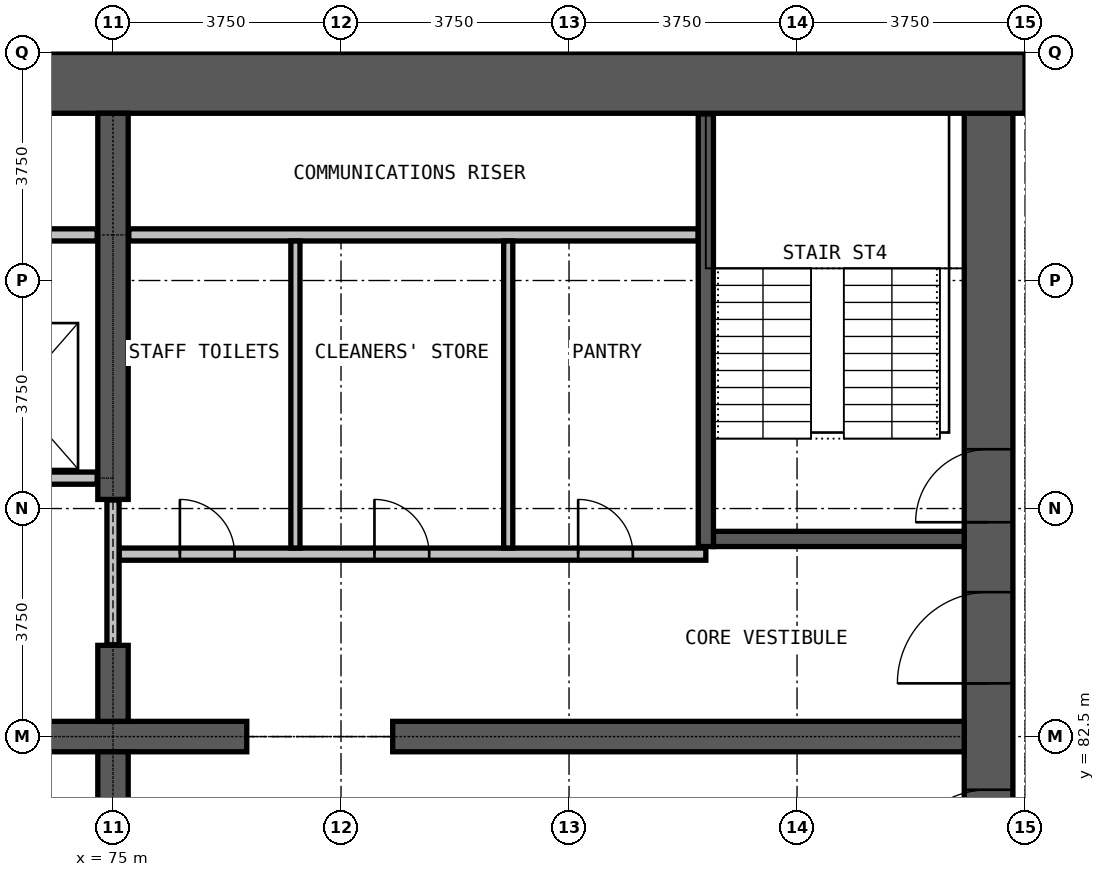
"""IFC4 building model, lengths in metres.
Left out: names, types, materials, properties, quantities, classifications, styles, units other than length and angle.
Written with IfcOpenShell. Run it as: python <this file> out.ifc"""

import sys

from ifc_helpers import new_model, si_unit, direction, frame, frame_2d, origin, place, context, subcontext, project, spatial, rectangle, extrude, element, fill, save


model = new_model("IFC4")
c1 = context("Model", 3, precision=1e-05, world=origin(), true_north=direction((0.0, 1.0)))
c2 = subcontext(c1, "Body", "Model", "MODEL_VIEW")
j1 = project(units=[si_unit("LENGTHUNIT", "METRE"), si_unit("PLANEANGLEUNIT", "RADIAN")], contexts=[c1])
p1 = place(None, origin())
s1 = spatial("IfcSite", under=j1, at=p1, CompositionType="ELEMENT")
p2 = place(p1, origin())
s2 = spatial("IfcBuilding", under=s1, at=p2, CompositionType="ELEMENT")
p3 = place(p2, frame((0.0, 0.0, 118.0)))
s3 = spatial("IfcBuildingStorey", under=s2, at=p3, CompositionType="ELEMENT", Elevation=118.0)
p4 = place(p3, frame((89.4, 72.25, 0.0), z_axis=(0.0, 0.0, 1.0), x_axis=(0.0, 1.0, 0.0)))
e1 = element("IfcWall", 1, at=p4, inside=s3, PredefinedType="SHEAR", context=c2, shape_type="SweptSolid", body=[
    extrude(rectangle(XDim=20.5, YDim=0.8, at=frame_2d((10.25, 0.0))), origin(), (0.0, 0.0, 1.0), 3.6),
])
p5 = place(p4, frame((0.275, 0.0, 0.0)))
e2 = element("IfcOpeningElement", 2, at=p5, cuts=e1, PredefinedType="OPENING", context=c2, shape_type="SweptSolid", body=[
    extrude(rectangle(XDim=1.2, YDim=2.2, at=frame_2d((0.6, 1.1))), frame((0.0, 0.41, 0.0), z_axis=(0.0, -1.0, 0.0), x_axis=(1.0, 0.0, 0.0)), (0.0, 0.0, 1.0), 0.82),
])
p6 = place(p4, frame((13.775, 0.0, 0.0)))
e3 = element("IfcOpeningElement", 3, at=p6, cuts=e1, PredefinedType="OPENING", context=c2, shape_type="SweptSolid", body=[
    extrude(rectangle(XDim=1.2, YDim=2.2, at=frame_2d((0.6, 1.1))), frame((0.0, 0.41, 0.0), z_axis=(0.0, -1.0, 0.0), x_axis=(1.0, 0.0, 0.0)), (0.0, 0.0, 1.0), 0.82),
])
p7 = place(p4, frame((7.875, 0.0, 0.0)))
e4 = element("IfcOpeningElement", 4, at=p7, cuts=e1, PredefinedType="OPENING", context=c2, shape_type="SweptSolid", body=[
    extrude(rectangle(XDim=1.5, YDim=2.2, at=frame_2d((0.75, 1.1))), frame((0.0, 0.41, 0.0), z_axis=(0.0, -1.0, 0.0), x_axis=(1.0, 0.0, 0.0)), (0.0, 0.0, 1.0), 0.82),
])
p8 = place(p4, frame((11.125, 0.0, 0.0)))
e5 = element("IfcOpeningElement", 5, at=p8, cuts=e1, PredefinedType="OPENING", context=c2, shape_type="SweptSolid", body=[
    extrude(rectangle(XDim=1.5, YDim=2.2, at=frame_2d((0.75, 1.1))), frame((0.0, 0.41, 0.0), z_axis=(0.0, -1.0, 0.0), x_axis=(1.0, 0.0, 0.0)), (0.0, 0.0, 1.0), 0.82),
])
p9 = place(p3, frame((90.0, 93.25, 0.0), z_axis=(0.0, 0.0, 1.0), x_axis=(-1.0, 0.0, 0.0)))
e6 = element("IfcWall", 6, at=p9, inside=s3, PredefinedType="SHEAR", context=c2, shape_type="SweptSolid", body=[
    extrude(rectangle(XDim=30.0, YDim=1.0, at=frame_2d((15.0, 0.0))), origin(), (0.0, 0.0, 1.0), 3.6),
])
p10 = place(p3, frame((72.8, 82.5, 0.0), z_axis=(0.0, 0.0, 1.0), x_axis=(1.0, 0.0, 0.0)))
e7 = element("IfcWall", 7, at=p10, inside=s3, PredefinedType="SHEAR", context=c2, shape_type="SweptSolid", body=[
    extrude(rectangle(XDim=4.4, YDim=0.5, at=frame_2d((2.2, 0.0))), origin(), (0.0, 0.0, 1.0), 3.6),
])
p11 = place(p3, frame((79.6, 82.5, 0.0), z_axis=(0.0, 0.0, 1.0), x_axis=(1.0, 0.0, 0.0)))
e8 = element("IfcWall", 8, at=p11, inside=s3, PredefinedType="SHEAR", context=c2, shape_type="SweptSolid", body=[
    extrude(rectangle(XDim=9.4, YDim=0.5, at=frame_2d((4.7, 0.0))), origin(), (0.0, 0.0, 1.0), 3.6),
])
for number, where, z_axis, x_axis in (
    (9, (75.0, 81.0, 0.0), (0.0, 0.0, 1.0), (0.0, 1.0, 0.0)),
    (10, (75.0, 82.75, 0.0), (0.0, 0.0, 1.0), (0.0, 1.0, 0.0)),
):
    element("IfcWall", number, at=place(p3, frame(where, z_axis=z_axis, x_axis=x_axis)), inside=s3, PredefinedType="SHEAR", context=c2, shape_type="SweptSolid", body=[
        extrude(rectangle(XDim=1.25, YDim=0.5, at=frame_2d((0.625, 0.0))), origin(), (0.0, 0.0, 1.0), 3.6),
    ])
p12 = place(p3, frame((75.0, 86.4, 0.0), z_axis=(0.0, 0.0, 1.0), x_axis=(0.0, 1.0, 0.0)))
e11 = element("IfcWall", 11, at=p12, inside=s3, PredefinedType="SHEAR", context=c2, shape_type="SweptSolid", body=[
    extrude(rectangle(XDim=6.35, YDim=0.5, at=frame_2d((3.175, 0.0))), origin(), (0.0, 0.0, 1.0), 3.6),
])
p13 = place(p3, frame((75.1, 85.5, 0.0), z_axis=(0.0, 0.0, 1.0), x_axis=(1.0, 0.0, 0.0)))
e12 = element("IfcWall", 12, at=p13, inside=s3, PredefinedType="PARTITIONING", context=c2, shape_type="SweptSolid", body=[
    extrude(rectangle(XDim=9.65, YDim=0.2, at=frame_2d((4.825, 0.0))), origin(), (0.0, 0.0, 1.0), 3.3),
])
p14 = place(p13, frame((1.0, 0.0, 0.0)))
e13 = element("IfcOpeningElement", 13, at=p14, cuts=e12, PredefinedType="OPENING", context=c2, shape_type="SweptSolid", body=[
    extrude(rectangle(XDim=0.9, YDim=2.2, at=frame_2d((0.45, 1.1))), frame((0.0, 0.11, 0.0), z_axis=(0.0, -1.0, 0.0), x_axis=(1.0, 0.0, 0.0)), (0.0, 0.0, 1.0), 0.22),
])
p15 = place(p13, frame((4.2, 0.0, 0.0)))
e14 = element("IfcOpeningElement", 14, at=p15, cuts=e12, PredefinedType="OPENING", context=c2, shape_type="SweptSolid", body=[
    extrude(rectangle(XDim=0.9, YDim=2.2, at=frame_2d((0.45, 1.1))), frame((0.0, 0.11, 0.0), z_axis=(0.0, -1.0, 0.0), x_axis=(1.0, 0.0, 0.0)), (0.0, 0.0, 1.0), 0.22),
])
p16 = place(p13, frame((7.55, 0.0, 0.0)))
e15 = element("IfcOpeningElement", 15, at=p16, cuts=e12, PredefinedType="OPENING", context=c2, shape_type="SweptSolid", body=[
    extrude(rectangle(XDim=0.9, YDim=2.2, at=frame_2d((0.45, 1.1))), frame((0.0, 0.11, 0.0), z_axis=(0.0, -1.0, 0.0), x_axis=(1.0, 0.0, 0.0)), (0.0, 0.0, 1.0), 0.22),
])
p17 = place(p3, frame((75.26, 90.75, 0.0), z_axis=(0.0, 0.0, 1.0), x_axis=(1.0, 0.0, 0.0)))
e16 = element("IfcWall", 16, at=p17, inside=s3, PredefinedType="PARTITIONING", context=c2, shape_type="SweptSolid", body=[
    extrude(rectangle(XDim=9.365, YDim=0.2, at=frame_2d((4.683, 0.0))), origin(), (0.0, 0.0, 1.0), 3.3),
])
p18 = place(p3, frame((75.0, 84.01, 0.0), z_axis=(0.0, 0.0, 1.0), x_axis=(0.0, 1.0, 0.0)))
e17 = element("IfcWall", 17, at=p18, inside=s3, PredefinedType="PARTITIONING", context=c2, shape_type="SweptSolid", body=[
    extrude(rectangle(XDim=2.38, YDim=0.2, at=frame_2d((1.19, 0.0))), origin(), (0.0, 0.0, 1.0), 2.4),
])
for number, where, z_axis, x_axis in (
    (18, (78.0, 85.6, 0.0), (0.0, 0.0, 1.0), (0.0, 1.0, 0.0)),
    (19, (81.5, 85.6, 0.0), (0.0, 0.0, 1.0), (0.0, 1.0, 0.0)),
):
    element("IfcWall", number, at=place(p3, frame(where, z_axis=z_axis, x_axis=x_axis)), inside=s3, PredefinedType="PARTITIONING", context=c2, shape_type="SweptSolid", body=[
        extrude(rectangle(XDim=5.05, YDim=0.15, at=frame_2d((2.525, 0.0))), origin(), (0.0, 0.0, 1.0), 3.3),
    ])
p19 = place(p3, frame((65.375, 86.75, 0.0), z_axis=(0.0, 0.0, 1.0), x_axis=(1.0, 0.0, 0.0)))
e20 = element("IfcWall", 20, at=p19, inside=s3, PredefinedType="PARTITIONING", context=c2, shape_type="SweptSolid", body=[
    extrude(rectangle(XDim=9.365, YDim=0.2, at=frame_2d((4.683, 0.0))), origin(), (0.0, 0.0, 1.0), 3.3),
])
p20 = place(p19, frame((1.0, 0.0, 0.0)))
e21 = element("IfcOpeningElement", 21, at=p20, cuts=e20, PredefinedType="OPENING", context=c2, shape_type="SweptSolid", body=[
    extrude(rectangle(XDim=1.1, YDim=2.2, at=frame_2d((0.55, 1.1))), frame((0.0, 0.11, 0.0), z_axis=(0.0, -1.0, 0.0), x_axis=(1.0, 0.0, 0.0)), (0.0, 0.0, 1.0), 0.22),
])
p21 = place(p19, frame((4.175, 0.0, 0.0)))
e22 = element("IfcOpeningElement", 22, at=p21, cuts=e20, PredefinedType="OPENING", context=c2, shape_type="SweptSolid", body=[
    extrude(rectangle(XDim=1.1, YDim=2.2, at=frame_2d((0.55, 1.1))), frame((0.0, 0.11, 0.0), z_axis=(0.0, -1.0, 0.0), x_axis=(1.0, 0.0, 0.0)), (0.0, 0.0, 1.0), 0.22),
])
p22 = place(p19, frame((7.325, 0.0, 0.0)))
e23 = element("IfcOpeningElement", 23, at=p22, cuts=e20, PredefinedType="OPENING", context=c2, shape_type="SweptSolid", body=[
    extrude(rectangle(XDim=1.1, YDim=2.2, at=frame_2d((0.55, 1.1))), frame((0.0, 0.11, 0.0), z_axis=(0.0, -1.0, 0.0), x_axis=(1.0, 0.0, 0.0)), (0.0, 0.0, 1.0), 0.22),
])
p23 = place(p3, frame((65.375, 90.75, 0.0), z_axis=(0.0, 0.0, 1.0), x_axis=(1.0, 0.0, 0.0)))
e24 = element("IfcWall", 24, at=p23, inside=s3, PredefinedType="PARTITIONING", context=c2, shape_type="SweptSolid", body=[
    extrude(rectangle(XDim=9.365, YDim=0.2, at=frame_2d((4.683, 0.0))), origin(), (0.0, 0.0, 1.0), 3.3),
])
p24 = place(p3, frame((84.875, 85.75, 0.0), z_axis=(0.0, 0.0, 1.0), x_axis=(1.0, 0.0, 0.0)))
e25 = element("IfcWall", 25, at=p24, inside=s3, PredefinedType="PARTITIONING", context=c2, shape_type="SweptSolid", body=[
    extrude(rectangle(XDim=4.125, YDim=0.25, at=frame_2d((2.062, 0.0))), origin(), (0.0, 0.0, 1.0), 3.3),
])
p25 = place(p3, frame((84.75, 85.625, 0.0), z_axis=(0.0, 0.0, 1.0), x_axis=(0.0, 1.0, 0.0)))
e26 = element("IfcWall", 26, at=p25, inside=s3, PredefinedType="PARTITIONING", context=c2, shape_type="SweptSolid", body=[
    extrude(rectangle(XDim=7.115, YDim=0.25, at=frame_2d((3.558, 0.0))), origin(), (0.0, 0.0, 1.0), 3.3),
])
p26 = place(p6, origin())
e27 = element("IfcDoor", 27, at=p26, inside=s3, OperationType="SINGLE_SWING_RIGHT", PredefinedType="DOOR", context=c2, shape_type="SweptSolid", body=[
    extrude(rectangle(XDim=1.2, YDim=2.2, at=frame_2d((0.6, 1.1))), frame((0.0, 0.025, 0.0), z_axis=(0.0, -1.0, 0.0), x_axis=(1.0, 0.0, 0.0)), (0.0, 0.0, 1.0), 0.05),
])
fill(e3, e27)
p27 = place(p7, origin())
e28 = element("IfcDoor", 28, at=p27, inside=s3, OperationType="DOUBLE_DOOR_SINGLE_SWING", PredefinedType="DOOR", context=c2, shape_type="SweptSolid", body=[
    extrude(rectangle(XDim=1.5, YDim=2.2, at=frame_2d((0.75, 1.1))), frame((0.0, 0.025, 0.0), z_axis=(0.0, -1.0, 0.0), x_axis=(1.0, 0.0, 0.0)), (0.0, 0.0, 1.0), 0.05),
])
fill(e4, e28)
p28 = place(p8, origin())
e29 = element("IfcDoor", 29, at=p28, inside=s3, OperationType="DOUBLE_DOOR_SINGLE_SWING", PredefinedType="DOOR", context=c2, shape_type="SweptSolid", body=[
    extrude(rectangle(XDim=1.5, YDim=2.2, at=frame_2d((0.75, 1.1))), frame((0.0, 0.025, 0.0), z_axis=(0.0, -1.0, 0.0), x_axis=(1.0, 0.0, 0.0)), (0.0, 0.0, 1.0), 0.05),
])
fill(e5, e29)
p29 = place(p14, origin())
e30 = element("IfcDoor", 30, at=p29, inside=s3, OperationType="SINGLE_SWING_RIGHT", PredefinedType="DOOR", context=c2, shape_type="SweptSolid", body=[
    extrude(rectangle(XDim=0.9, YDim=2.2, at=frame_2d((0.45, 1.1))), frame((0.0, 0.025, 0.0), z_axis=(0.0, -1.0, 0.0), x_axis=(1.0, 0.0, 0.0)), (0.0, 0.0, 1.0), 0.05),
])
fill(e13, e30)
p30 = place(p15, origin())
e31 = element("IfcDoor", 31, at=p30, inside=s3, OperationType="SINGLE_SWING_LEFT", PredefinedType="DOOR", context=c2, shape_type="SweptSolid", body=[
    extrude(rectangle(XDim=0.9, YDim=2.2, at=frame_2d((0.45, 1.1))), frame((0.0, 0.025, 0.0), z_axis=(0.0, -1.0, 0.0), x_axis=(1.0, 0.0, 0.0)), (0.0, 0.0, 1.0), 0.05),
])
fill(e14, e31)
p31 = place(p16, origin())
e32 = element("IfcDoor", 32, at=p31, inside=s3, OperationType="SINGLE_SWING_RIGHT", PredefinedType="DOOR", context=c2, shape_type="SweptSolid", body=[
    extrude(rectangle(XDim=0.9, YDim=2.2, at=frame_2d((0.45, 1.1))), frame((0.0, 0.025, 0.0), z_axis=(0.0, -1.0, 0.0), x_axis=(1.0, 0.0, 0.0)), (0.0, 0.0, 1.0), 0.05),
])
fill(e15, e32)
save(model, sys.argv[1])
